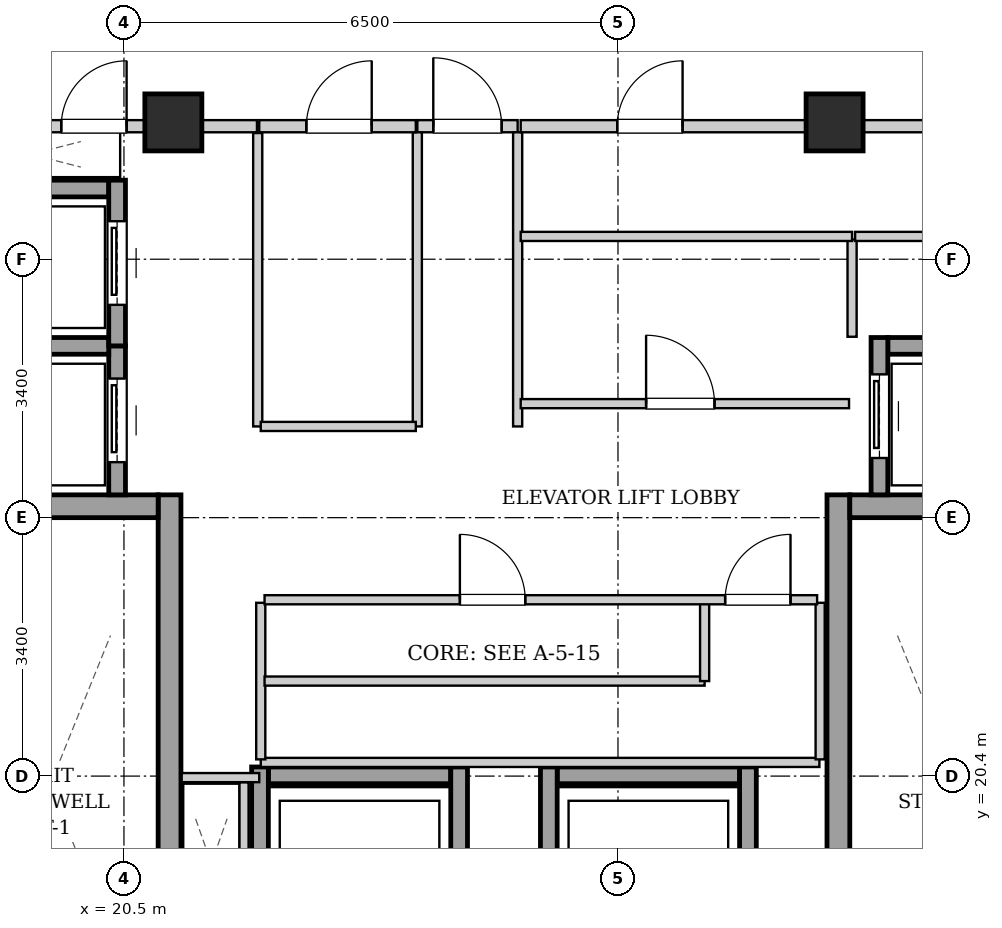
"""IFC4 building model, lengths in metres.
Left out: names, types, materials, properties, quantities, classifications, styles, units other than length and angle.
Written with IfcOpenShell. Run it as: python <this file> out.ifc"""

import sys

from ifc_helpers import new_model, si_unit, direction, frame, frame_2d, origin, origin_2d, place, context, subcontext, project, spatial, rectangle, extrude, element, fill, save


model = new_model("IFC4")
c1 = context("Model", 3, precision=1e-05, world=origin(), true_north=direction((0.0, 1.0)))
c2 = subcontext(c1, "Body", "Model", "MODEL_VIEW")
j1 = project(units=[si_unit("LENGTHUNIT", "METRE"), si_unit("PLANEANGLEUNIT", "RADIAN")], contexts=[c1])
p1 = place(None, origin())
s1 = spatial("IfcSite", under=j1, at=p1, CompositionType="ELEMENT")
p2 = place(p1, origin())
s2 = spatial("IfcBuilding", under=s1, at=p2, CompositionType="ELEMENT")
p3 = place(p2, frame((0.0, 0.0, 237.7)))
s3 = spatial("IfcBuildingStorey", under=s2, at=p3, CompositionType="ELEMENT", Elevation=237.7)
for number, where, z_axis, x_axis in (
    (1, (21.15, 29.0, 0.0), (0.0, 0.0, 1.0), (1.0, 0.0, 0.0)),
    (2, (29.85, 29.0, 0.0), (0.0, 0.0, 1.0), (1.0, 0.0, 0.0)),
):
    element("IfcColumn", number, at=place(p3, frame(where, z_axis=z_axis, x_axis=x_axis)), inside=s3, PredefinedType="COLUMN", context=c2, shape_type="SweptSolid", body=[
        extrude(rectangle(XDim=0.75, YDim=0.75, at=origin_2d()), origin(), (0.0, 0.0, 1.0), 3.4),
    ])
p4 = place(p3, frame((21.1, 15.1, 0.0), z_axis=(0.0, 0.0, 1.0), x_axis=(0.0, 1.0, 0.0)))
e3 = element("IfcWall", 3, at=p4, inside=s3, PredefinedType="SHEAR", context=c2, shape_type="SweptSolid", body=[
    extrude(rectangle(XDim=9.0, YDim=0.3, at=frame_2d((4.5, 0.0))), origin(), (0.0, 0.0, 1.0), 3.14),
])
p5 = place(p3, frame((18.1, 23.95, 0.0), z_axis=(0.0, 0.0, 1.0), x_axis=(1.0, 0.0, 0.0)))
e4 = element("IfcWall", 4, at=p5, inside=s3, PredefinedType="SHEAR", context=c2, shape_type="SweptSolid", body=[
    extrude(rectangle(XDim=2.85, YDim=0.3, at=frame_2d((1.425, 0.0))), origin(), (0.0, 0.0, 1.0), 3.14),
])
p6 = place(p3, frame((29.9, 15.1, 0.0), z_axis=(0.0, 0.0, 1.0), x_axis=(0.0, 1.0, 0.0)))
e5 = element("IfcWall", 5, at=p6, inside=s3, PredefinedType="SHEAR", context=c2, shape_type="SweptSolid", body=[
    extrude(rectangle(XDim=9.0, YDim=0.3, at=frame_2d((4.5, 0.0))), origin(), (0.0, 0.0, 1.0), 3.14),
])
p7 = place(p3, frame((30.05, 23.95, 0.0), z_axis=(0.0, 0.0, 1.0), x_axis=(1.0, 0.0, 0.0)))
e6 = element("IfcWall", 6, at=p7, inside=s3, PredefinedType="SHEAR", context=c2, shape_type="SweptSolid", body=[
    extrude(rectangle(XDim=2.85, YDim=0.3, at=frame_2d((1.425, 0.0))), origin(), (0.0, 0.0, 1.0), 3.14),
])
p8 = place(p3, frame((20.41, 24.1, 0.0), z_axis=(0.0, 0.0, 1.0), x_axis=(0.0, 1.0, 0.0)))
e7 = element("IfcWall", 7, at=p8, inside=s3, PredefinedType="SHEAR", context=c2, shape_type="SweptSolid", body=[
    extrude(rectangle(XDim=1.96, YDim=0.22, at=frame_2d((0.98, 0.0))), origin(), (0.0, 0.0, 1.0), 3.14),
])
p9 = place(p8, frame((0.43, 0.0, 0.0)))
e8 = element("IfcOpeningElement", 8, at=p9, cuts=e7, PredefinedType="OPENING", context=c2, shape_type="SweptSolid", body=[
    extrude(rectangle(XDim=1.1, YDim=2.15, at=frame_2d((0.55, 1.075))), frame((0.0, 0.12, 0.0), z_axis=(0.0, -1.0, 0.0), x_axis=(1.0, 0.0, 0.0)), (0.0, 0.0, 1.0), 0.24),
])
for number, where, z_axis, x_axis in (
    (9, (18.4, 26.06, 0.0), (0.0, 0.0, 1.0), (1.0, 0.0, 0.0)),
    (10, (18.4, 28.13, 0.0), (0.0, 0.0, 1.0), (1.0, 0.0, 0.0)),
):
    element("IfcWall", number, at=place(p3, frame(where, z_axis=z_axis, x_axis=x_axis)), inside=s3, PredefinedType="SHEAR", context=c2, shape_type="SweptSolid", body=[
        extrude(rectangle(XDim=1.9, YDim=0.22, at=frame_2d((0.95, 0.0))), origin(), (0.0, 0.0, 1.0), 3.14),
    ])
p10 = place(p3, frame((20.41, 26.06, 0.0), z_axis=(0.0, 0.0, 1.0), x_axis=(0.0, 1.0, 0.0)))
e11 = element("IfcWall", 11, at=p10, inside=s3, PredefinedType="SHEAR", context=c2, shape_type="SweptSolid", body=[
    extrude(rectangle(XDim=2.18, YDim=0.22, at=frame_2d((1.09, 0.0))), origin(), (0.0, 0.0, 1.0), 3.14),
])
p11 = place(p10, frame((0.54, 0.0, 0.0)))
e12 = element("IfcOpeningElement", 12, at=p11, cuts=e11, PredefinedType="OPENING", context=c2, shape_type="SweptSolid", body=[
    extrude(rectangle(XDim=1.1, YDim=2.15, at=frame_2d((0.55, 1.075))), frame((0.0, 0.12, 0.0), z_axis=(0.0, -1.0, 0.0), x_axis=(1.0, 0.0, 0.0)), (0.0, 0.0, 1.0), 0.24),
])
p12 = place(p3, frame((30.55, 26.06, 0.0), z_axis=(0.0, 0.0, 1.0), x_axis=(1.0, 0.0, 0.0)))
e13 = element("IfcWall", 13, at=p12, inside=s3, PredefinedType="SHEAR", context=c2, shape_type="SweptSolid", body=[
    extrude(rectangle(XDim=1.9, YDim=0.22, at=frame_2d((0.95, 0.0))), origin(), (0.0, 0.0, 1.0), 3.14),
])
p13 = place(p3, frame((30.44, 24.1, 0.0), z_axis=(0.0, 0.0, 1.0), x_axis=(0.0, 1.0, 0.0)))
e14 = element("IfcWall", 14, at=p13, inside=s3, PredefinedType="SHEAR", context=c2, shape_type="SweptSolid", body=[
    extrude(rectangle(XDim=2.07, YDim=0.22, at=frame_2d((1.035, 0.0))), origin(), (0.0, 0.0, 1.0), 3.14),
])
p14 = place(p13, frame((0.485, 0.0, 0.0)))
e15 = element("IfcOpeningElement", 15, at=p14, cuts=e14, PredefinedType="OPENING", context=c2, shape_type="SweptSolid", body=[
    extrude(rectangle(XDim=1.1, YDim=2.15, at=frame_2d((0.55, 1.075))), frame((0.0, 0.12, 0.0), z_axis=(0.0, -1.0, 0.0), x_axis=(1.0, 0.0, 0.0)), (0.0, 0.0, 1.0), 0.24),
])
p15 = place(p3, frame((22.4, 20.41, 0.0), z_axis=(0.0, 0.0, 1.0), x_axis=(1.0, 0.0, 0.0)))
e16 = element("IfcWall", 16, at=p15, inside=s3, PredefinedType="SHEAR", context=c2, shape_type="SweptSolid", body=[
    extrude(rectangle(XDim=2.4, YDim=0.22, at=frame_2d((1.2, 0.0))), origin(), (0.0, 0.0, 1.0), 3.14),
])
for number, where, z_axis, x_axis in (
    (17, (22.29, 17.98, 0.0), (0.0, 0.0, 1.0), (0.0, 1.0, 0.0)),
    (18, (24.91, 17.98, 0.0), (0.0, 0.0, 1.0), (0.0, 1.0, 0.0)),
):
    element("IfcWall", number, at=place(p3, frame(where, z_axis=z_axis, x_axis=x_axis)), inside=s3, PredefinedType="SHEAR", context=c2, shape_type="SweptSolid", body=[
        extrude(rectangle(XDim=2.54, YDim=0.22, at=frame_2d((1.27, 0.0))), origin(), (0.0, 0.0, 1.0), 3.14),
    ])
p16 = place(p3, frame((26.2, 20.41, 0.0), z_axis=(0.0, 0.0, 1.0), x_axis=(1.0, 0.0, 0.0)))
e19 = element("IfcWall", 19, at=p16, inside=s3, PredefinedType="SHEAR", context=c2, shape_type="SweptSolid", body=[
    extrude(rectangle(XDim=2.4, YDim=0.22, at=frame_2d((1.2, 0.0))), origin(), (0.0, 0.0, 1.0), 3.14),
])
for number, where, z_axis, x_axis in (
    (20, (26.09, 17.98, 0.0), (0.0, 0.0, 1.0), (0.0, 1.0, 0.0)),
    (21, (28.71, 17.98, 0.0), (0.0, 0.0, 1.0), (0.0, 1.0, 0.0)),
):
    element("IfcWall", number, at=place(p3, frame(where, z_axis=z_axis, x_axis=x_axis)), inside=s3, PredefinedType="SHEAR", context=c2, shape_type="SweptSolid", body=[
        extrude(rectangle(XDim=2.54, YDim=0.22, at=frame_2d((1.27, 0.0))), origin(), (0.0, 0.0, 1.0), 3.14),
    ])
p17 = place(p3, frame((24.36, 28.95, 0.0), z_axis=(0.0, 0.0, 1.0), x_axis=(1.0, 0.0, 0.0)))
e22 = element("IfcWall", 22, at=p17, inside=s3, PredefinedType="PARTITIONING", context=c2, shape_type="SweptSolid", body=[
    extrude(rectangle(XDim=1.32, YDim=0.16, at=frame_2d((0.66, 0.0))), origin(), (0.0, 0.0, 1.0), 2.668),
])
p18 = place(p17, frame((0.21, 0.0, 0.0)))
e23 = element("IfcOpeningElement", 23, at=p18, cuts=e22, PredefinedType="OPENING", context=c2, shape_type="SweptSolid", body=[
    extrude(rectangle(XDim=0.9, YDim=2.05, at=frame_2d((0.45, 1.025))), frame((0.0, 0.09, 0.0), z_axis=(0.0, -1.0, 0.0), x_axis=(1.0, 0.0, 0.0)), (0.0, 0.0, 1.0), 0.18),
])
p19 = place(p3, frame((17.96, 28.95, 0.0), z_axis=(0.0, 0.0, 1.0), x_axis=(1.0, 0.0, 0.0)))
e24 = element("IfcWall", 24, at=p19, inside=s3, PredefinedType="PARTITIONING", context=c2, shape_type="SweptSolid", body=[
    extrude(rectangle(XDim=4.29, YDim=0.16, at=frame_2d((2.145, 0.0))), origin(), (0.0, 0.0, 1.0), 2.668),
])
p20 = place(p19, frame((1.715, 0.0, 0.0)))
e25 = element("IfcOpeningElement", 25, at=p20, cuts=e24, PredefinedType="OPENING", context=c2, shape_type="SweptSolid", body=[
    extrude(rectangle(XDim=0.86, YDim=2.05, at=frame_2d((0.43, 1.025))), frame((0.0, 0.09, 0.0), z_axis=(0.0, -1.0, 0.0), x_axis=(1.0, 0.0, 0.0)), (0.0, 0.0, 1.0), 0.18),
])
p21 = place(p3, frame((22.08, 18.2, 0.0), z_axis=(0.0, 0.0, 1.0), x_axis=(0.0, 1.0, 0.0)))
e26 = element("IfcWall", 26, at=p21, inside=s3, PredefinedType="PARTITIONING", context=c2, shape_type="SweptSolid", body=[
    extrude(rectangle(XDim=2.12, YDim=0.12, at=frame_2d((1.06, 0.0))), origin(), (0.0, 0.0, 1.0), 3.14),
])
p22 = place(p3, frame((22.28, 20.38, 0.0), z_axis=(0.0, 0.0, 1.0), x_axis=(-1.0, 0.0, 0.0)))
e27 = element("IfcWall", 27, at=p22, inside=s3, PredefinedType="PARTITIONING", context=c2, shape_type="SweptSolid", body=[
    extrude(rectangle(XDim=1.02, YDim=0.12, at=frame_2d((0.51, 0.0))), origin(), (0.0, 0.0, 1.0), 3.14),
])
for number, where, z_axis, x_axis in (
    (28, (24.36, 25.0, 0.0), (0.0, 0.0, 1.0), (0.0, 1.0, 0.0)),
    (29, (25.68, 25.0, 0.0), (0.0, 0.0, 1.0), (0.0, 1.0, 0.0)),
):
    element("IfcWall", number, at=place(p3, frame(where, z_axis=z_axis, x_axis=x_axis)), inside=s3, PredefinedType="PARTITIONING", context=c2, shape_type="SweptSolid", body=[
        extrude(rectangle(XDim=3.87, YDim=0.12, at=frame_2d((1.935, 0.0))), origin(), (0.0, 0.0, 1.0), 3.14),
    ])
p23 = place(p3, frame((30.08, 26.18, 0.0), z_axis=(0.0, 0.0, 1.0), x_axis=(0.0, 1.0, 0.0)))
e30 = element("IfcWall", 30, at=p23, inside=s3, PredefinedType="PARTITIONING", context=c2, shape_type="SweptSolid", body=[
    extrude(rectangle(XDim=1.28, YDim=0.12, at=frame_2d((0.64, 0.0))), origin(), (0.0, 0.0, 1.0), 3.14),
])
p24 = place(p3, frame((30.12, 27.5, 0.0), z_axis=(0.0, 0.0, 1.0), x_axis=(1.0, 0.0, 0.0)))
e31 = element("IfcWall", 31, at=p24, inside=s3, PredefinedType="PARTITIONING", context=c2, shape_type="SweptSolid", body=[
    extrude(rectangle(XDim=2.92, YDim=0.12, at=frame_2d((1.46, 0.0))), origin(), (0.0, 0.0, 1.0), 3.14),
])
p25 = place(p24, frame((0.97, 0.0, 0.0)))
e32 = element("IfcOpeningElement", 32, at=p25, cuts=e31, PredefinedType="OPENING", context=c2, shape_type="SweptSolid", body=[
    extrude(rectangle(XDim=0.86, YDim=2.05, at=frame_2d((0.43, 1.025))), frame((0.0, 0.07, 0.0), z_axis=(0.0, -1.0, 0.0), x_axis=(1.0, 0.0, 0.0)), (0.0, 0.0, 1.0), 0.14),
])
p26 = place(p3, frame((22.26, 25.0, 0.0), z_axis=(0.0, 0.0, 1.0), x_axis=(0.0, 1.0, 0.0)))
e33 = element("IfcWall", 33, at=p26, inside=s3, PredefinedType="PARTITIONING", context=c2, shape_type="SweptSolid", body=[
    extrude(rectangle(XDim=3.86, YDim=0.12, at=frame_2d((1.93, 0.0))), origin(), (0.0, 0.0, 1.0), 3.14),
])
p27 = place(p3, frame((22.3, 25.0, 0.0), z_axis=(0.0, 0.0, 1.0), x_axis=(1.0, 0.0, 0.0)))
e34 = element("IfcWall", 34, at=p27, inside=s3, PredefinedType="PARTITIONING", context=c2, shape_type="SweptSolid", body=[
    extrude(rectangle(XDim=2.04, YDim=0.12, at=frame_2d((1.02, 0.0))), origin(), (0.0, 0.0, 1.0), 3.14),
])
p28 = place(p3, frame((22.28, 28.95, 0.0), z_axis=(0.0, 0.0, 1.0), x_axis=(1.0, 0.0, 0.0)))
e35 = element("IfcWall", 35, at=p28, inside=s3, PredefinedType="PARTITIONING", context=c2, shape_type="SweptSolid", body=[
    extrude(rectangle(XDim=2.06, YDim=0.16, at=frame_2d((1.03, 0.0))), origin(), (0.0, 0.0, 1.0), 2.668),
])
p29 = place(p28, frame((0.62, 0.0, 0.0)))
e36 = element("IfcOpeningElement", 36, at=p29, cuts=e35, PredefinedType="OPENING", context=c2, shape_type="SweptSolid", body=[
    extrude(rectangle(XDim=0.86, YDim=2.05, at=frame_2d((0.43, 1.025))), frame((0.0, 0.09, 0.0), z_axis=(0.0, -1.0, 0.0), x_axis=(1.0, 0.0, 0.0)), (0.0, 0.0, 1.0), 0.18),
])
p30 = place(p3, frame((25.72, 27.5, 0.0), z_axis=(0.0, 0.0, 1.0), x_axis=(1.0, 0.0, 0.0)))
e37 = element("IfcWall", 37, at=p30, inside=s3, PredefinedType="PARTITIONING", context=c2, shape_type="SweptSolid", body=[
    extrude(rectangle(XDim=4.36, YDim=0.12, at=frame_2d((2.18, 0.0))), origin(), (0.0, 0.0, 1.0), 3.14),
])
p31 = place(p3, frame((25.72, 25.3, 0.0), z_axis=(0.0, 0.0, 1.0), x_axis=(1.0, 0.0, 0.0)))
e38 = element("IfcWall", 38, at=p31, inside=s3, PredefinedType="PARTITIONING", context=c2, shape_type="SweptSolid", body=[
    extrude(rectangle(XDim=4.32, YDim=0.12, at=frame_2d((2.16, 0.0))), origin(), (0.0, 0.0, 1.0), 3.14),
])
p32 = place(p31, frame((1.65, 0.0, 0.0)))
e39 = element("IfcOpeningElement", 39, at=p32, cuts=e38, PredefinedType="OPENING", context=c2, shape_type="SweptSolid", body=[
    extrude(rectangle(XDim=0.9, YDim=2.05, at=frame_2d((0.45, 1.025))), frame((0.0, 0.07, 0.0), z_axis=(0.0, -1.0, 0.0), x_axis=(1.0, 0.0, 0.0)), (0.0, 0.0, 1.0), 0.14),
])
p33 = place(p3, frame((25.72, 28.95, 0.0), z_axis=(0.0, 0.0, 1.0), x_axis=(1.0, 0.0, 0.0)))
e40 = element("IfcWall", 40, at=p33, inside=s3, PredefinedType="PARTITIONING", context=c2, shape_type="SweptSolid", body=[
    extrude(rectangle(XDim=7.32, YDim=0.16, at=frame_2d((3.66, 0.0))), origin(), (0.0, 0.0, 1.0), 2.668),
])
p34 = place(p33, frame((1.27, 0.0, 0.0)))
e41 = element("IfcOpeningElement", 41, at=p34, cuts=e40, PredefinedType="OPENING", context=c2, shape_type="SweptSolid", body=[
    extrude(rectangle(XDim=0.86, YDim=2.05, at=frame_2d((0.43, 1.025))), frame((0.0, 0.09, 0.0), z_axis=(0.0, -1.0, 0.0), x_axis=(1.0, 0.0, 0.0)), (0.0, 0.0, 1.0), 0.18),
])
p35 = place(p3, frame((22.3, 20.58, 0.0), z_axis=(0.0, 0.0, 1.0), x_axis=(1.0, 0.0, 0.0)))
e42 = element("IfcWall", 42, at=p35, inside=s3, PredefinedType="PARTITIONING", context=c2, shape_type="SweptSolid", body=[
    extrude(rectangle(XDim=7.35, YDim=0.12, at=frame_2d((3.675, 0.0))), origin(), (0.0, 0.0, 1.0), 3.14),
])
for number, where, z_axis, x_axis in (
    (43, (22.3, 20.62, 0.0), (0.0, 0.0, 1.0), (0.0, 1.0, 0.0)),
    (44, (29.66, 20.62, 0.0), (0.0, 0.0, 1.0), (0.0, 1.0, 0.0)),
):
    element("IfcWall", number, at=place(p3, frame(where, z_axis=z_axis, x_axis=x_axis)), inside=s3, PredefinedType="PARTITIONING", context=c2, shape_type="SweptSolid", body=[
        extrude(rectangle(XDim=2.06, YDim=0.12, at=frame_2d((1.03, 0.0))), origin(), (0.0, 0.0, 1.0), 3.14),
    ])
p36 = place(p3, frame((22.35, 21.65, 0.0), z_axis=(0.0, 0.0, 1.0), x_axis=(1.0, 0.0, 0.0)))
e45 = element("IfcWall", 45, at=p36, inside=s3, PredefinedType="PARTITIONING", context=c2, shape_type="SweptSolid", body=[
    extrude(rectangle(XDim=5.79, YDim=0.12, at=frame_2d((2.895, 0.0))), origin(), (0.0, 0.0, 1.0), 3.14),
])
p37 = place(p3, frame((28.14, 21.65, 0.0), z_axis=(0.0, 0.0, 1.0), x_axis=(0.0, 1.0, 0.0)))
e46 = element("IfcWall", 46, at=p37, inside=s3, PredefinedType="PARTITIONING", context=c2, shape_type="SweptSolid", body=[
    extrude(rectangle(XDim=1.03, YDim=0.12, at=frame_2d((0.515, 0.0))), origin(), (0.0, 0.0, 1.0), 3.14),
])
p38 = place(p3, frame((22.35, 22.72, 0.0), z_axis=(0.0, 0.0, 1.0), x_axis=(1.0, 0.0, 0.0)))
e47 = element("IfcWall", 47, at=p38, inside=s3, PredefinedType="PARTITIONING", context=c2, shape_type="SweptSolid", body=[
    extrude(rectangle(XDim=7.27, YDim=0.12, at=frame_2d((3.635, 0.0))), origin(), (0.0, 0.0, 1.0), 3.14),
])
p39 = place(p38, frame((2.57, 0.0, 0.0)))
e48 = element("IfcOpeningElement", 48, at=p39, cuts=e47, PredefinedType="OPENING", context=c2, shape_type="SweptSolid", body=[
    extrude(rectangle(XDim=0.86, YDim=2.05, at=frame_2d((0.43, 1.025))), frame((0.0, 0.07, 0.0), z_axis=(0.0, -1.0, 0.0), x_axis=(1.0, 0.0, 0.0)), (0.0, 0.0, 1.0), 0.14),
])
p40 = place(p38, frame((6.06, 0.0, 0.0)))
e49 = element("IfcOpeningElement", 49, at=p40, cuts=e47, PredefinedType="OPENING", context=c2, shape_type="SweptSolid", body=[
    extrude(rectangle(XDim=0.86, YDim=2.05, at=frame_2d((0.43, 1.025))), frame((0.0, 0.07, 0.0), z_axis=(0.0, -1.0, 0.0), x_axis=(1.0, 0.0, 0.0)), (0.0, 0.0, 1.0), 0.14),
])
p41 = place(p9, origin())
e50 = element("IfcDoor", 50, at=p41, inside=s3, OperationType="SLIDING_TO_LEFT", PredefinedType="DOOR", context=c2, shape_type="SweptSolid", body=[
    extrude(rectangle(XDim=1.1, YDim=2.15, at=frame_2d((0.55, 1.075))), frame((0.0, 0.025, 0.0), z_axis=(0.0, -1.0, 0.0), x_axis=(1.0, 0.0, 0.0)), (0.0, 0.0, 1.0), 0.05),
])
fill(e8, e50)
p42 = place(p11, origin())
e51 = element("IfcDoor", 51, at=p42, inside=s3, OperationType="SLIDING_TO_LEFT", PredefinedType="DOOR", context=c2, shape_type="SweptSolid", body=[
    extrude(rectangle(XDim=1.1, YDim=2.15, at=frame_2d((0.55, 1.075))), frame((0.0, 0.025, 0.0), z_axis=(0.0, -1.0, 0.0), x_axis=(1.0, 0.0, 0.0)), (0.0, 0.0, 1.0), 0.05),
])
fill(e12, e51)
p43 = place(p14, origin())
e52 = element("IfcDoor", 52, at=p43, inside=s3, OperationType="SLIDING_TO_LEFT", PredefinedType="DOOR", context=c2, shape_type="SweptSolid", body=[
    extrude(rectangle(XDim=1.1, YDim=2.15, at=frame_2d((0.55, 1.075))), frame((0.0, 0.025, 0.0), z_axis=(0.0, -1.0, 0.0), x_axis=(1.0, 0.0, 0.0)), (0.0, 0.0, 1.0), 0.05),
])
fill(e15, e52)
p44 = place(p18, origin())
e53 = element("IfcDoor", 53, at=p44, inside=s3, OperationType="SINGLE_SWING_LEFT", PredefinedType="DOOR", context=c2, shape_type="SweptSolid", body=[
    extrude(rectangle(XDim=0.9, YDim=2.05, at=frame_2d((0.45, 1.025))), frame((0.0, 0.025, 0.0), z_axis=(0.0, -1.0, 0.0), x_axis=(1.0, 0.0, 0.0)), (0.0, 0.0, 1.0), 0.05),
])
fill(e23, e53)
p45 = place(p20, origin())
e54 = element("IfcDoor", 54, at=p45, inside=s3, OperationType="SINGLE_SWING_RIGHT", PredefinedType="DOOR", context=c2, shape_type="SweptSolid", body=[
    extrude(rectangle(XDim=0.86, YDim=2.05, at=frame_2d((0.43, 1.025))), frame((0.0, 0.025, 0.0), z_axis=(0.0, -1.0, 0.0), x_axis=(1.0, 0.0, 0.0)), (0.0, 0.0, 1.0), 0.05),
])
fill(e25, e54)
p46 = place(p29, origin())
e55 = element("IfcDoor", 55, at=p46, inside=s3, OperationType="SINGLE_SWING_RIGHT", PredefinedType="DOOR", context=c2, shape_type="SweptSolid", body=[
    extrude(rectangle(XDim=0.86, YDim=2.05, at=frame_2d((0.43, 1.025))), frame((0.0, 0.025, 0.0), z_axis=(0.0, -1.0, 0.0), x_axis=(1.0, 0.0, 0.0)), (0.0, 0.0, 1.0), 0.05),
])
fill(e36, e55)
p47 = place(p32, origin())
e56 = element("IfcDoor", 56, at=p47, inside=s3, OperationType="SINGLE_SWING_LEFT", PredefinedType="DOOR", context=c2, shape_type="SweptSolid", body=[
    extrude(rectangle(XDim=0.9, YDim=2.05, at=frame_2d((0.45, 1.025))), frame((0.0, 0.025, 0.0), z_axis=(0.0, -1.0, 0.0), x_axis=(1.0, 0.0, 0.0)), (0.0, 0.0, 1.0), 0.05),
])
fill(e39, e56)
p48 = place(p34, origin())
e57 = element("IfcDoor", 57, at=p48, inside=s3, OperationType="SINGLE_SWING_RIGHT", PredefinedType="DOOR", context=c2, shape_type="SweptSolid", body=[
    extrude(rectangle(XDim=0.86, YDim=2.05, at=frame_2d((0.43, 1.025))), frame((0.0, 0.025, 0.0), z_axis=(0.0, -1.0, 0.0), x_axis=(1.0, 0.0, 0.0)), (0.0, 0.0, 1.0), 0.05),
])
fill(e41, e57)
p49 = place(p39, origin())
e58 = element("IfcDoor", 58, at=p49, inside=s3, OperationType="SINGLE_SWING_LEFT", PredefinedType="DOOR", context=c2, shape_type="SweptSolid", body=[
    extrude(rectangle(XDim=0.86, YDim=2.05, at=frame_2d((0.43, 1.025))), frame((0.0, 0.025, 0.0), z_axis=(0.0, -1.0, 0.0), x_axis=(1.0, 0.0, 0.0)), (0.0, 0.0, 1.0), 0.05),
])
fill(e48, e58)
p50 = place(p40, origin())
e59 = element("IfcDoor", 59, at=p50, inside=s3, OperationType="SINGLE_SWING_RIGHT", PredefinedType="DOOR", context=c2, shape_type="SweptSolid", body=[
    extrude(rectangle(XDim=0.86, YDim=2.05, at=frame_2d((0.43, 1.025))), frame((0.0, 0.025, 0.0), z_axis=(0.0, -1.0, 0.0), x_axis=(1.0, 0.0, 0.0)), (0.0, 0.0, 1.0), 0.05),
])
fill(e49, e59)
save(model, sys.argv[1])
